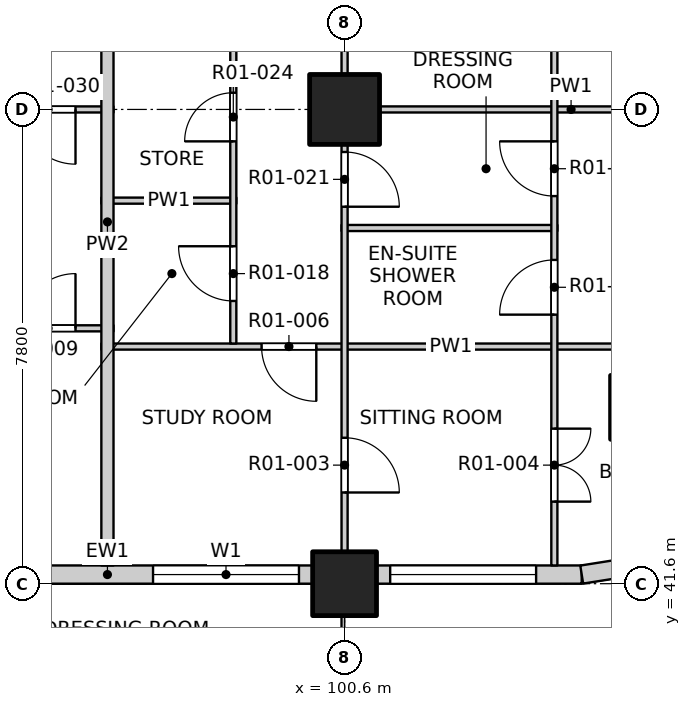
"""IFC4 building model, lengths in metres.
Left out: names, types, materials, properties, quantities, classifications, styles, units other than length and angle.
Written with IfcOpenShell. Run it as: python <this file> out.ifc"""

import sys

from ifc_helpers import new_model, si_unit, direction, frame, frame_2d, origin, origin_2d, place, context, subcontext, project, spatial, rectangle, extrude, element, fill, save


model = new_model("IFC4")
c1 = context("Model", 3, precision=1e-05, world=origin(), true_north=direction((0.0, 1.0)))
c2 = subcontext(c1, "Body", "Model", "MODEL_VIEW")
j1 = project(units=[si_unit("LENGTHUNIT", "METRE"), si_unit("PLANEANGLEUNIT", "RADIAN")], contexts=[c1])
p1 = place(None, origin())
s1 = spatial("IfcSite", under=j1, at=p1, CompositionType="ELEMENT")
p2 = place(p1, origin())
s2 = spatial("IfcBuilding", under=s1, at=p2, CompositionType="ELEMENT")
p3 = place(p2, frame((0.0, 0.0, 26.3)))
s3 = spatial("IfcBuildingStorey", under=s2, at=p3, CompositionType="ELEMENT", Elevation=26.3)
for number, where, z_axis, x_axis in (
    (1, (105.5, 44.5, -0.25), (0.0, 0.0, 1.0), (1.0, 0.0, 0.0)),
    (2, (100.6, 41.6, -0.25), (0.0, 0.0, 1.0), (1.0, 0.0, 0.0)),
):
    element("IfcColumn", number, at=place(p3, frame(where, z_axis=z_axis, x_axis=x_axis)), inside=s3, PredefinedType="COLUMN", context=c2, shape_type="SweptSolid", body=[
        extrude(rectangle(XDim=1.05, YDim=1.05, at=origin_2d()), origin(), (0.0, 0.0, 1.0), 3.4),
    ])
p4 = place(p3, frame((100.6, 49.4, -0.25), z_axis=(0.0, 0.0, 1.0), x_axis=(1.0, 0.0, 0.0)))
e3 = element("IfcColumn", 3, at=p4, inside=s3, PredefinedType="COLUMN", context=c2, shape_type="SweptSolid", body=[
    extrude(rectangle(XDim=1.15, YDim=1.15, at=origin_2d()), origin(), (0.0, 0.0, 1.0), 3.4),
])
p5 = place(p3, frame((93.325, 41.75, 0.0), z_axis=(0.0, 0.0, 1.0), x_axis=(1.0, 0.0, 0.0)))
e4 = element("IfcWall", 4, at=p5, inside=s3, PredefinedType="SOLIDWALL", context=c2, shape_type="SweptSolid", body=[
    extrude(rectangle(XDim=6.75, YDim=0.3, at=frame_2d((3.375, 0.0))), origin(), (0.0, 0.0, 1.0), 2.7),
])
p6 = place(p5, frame((0.525, 0.0, 0.0)))
e5 = element("IfcOpeningElement", 5, at=p6, cuts=e4, PredefinedType="OPENING", context=c2, shape_type="SweptSolid", body=[
    extrude(rectangle(XDim=1.8, YDim=2.4, at=frame_2d((0.9, 1.2))), frame((0.0, 0.16, 0.0), z_axis=(0.0, -1.0, 0.0), x_axis=(1.0, 0.0, 0.0)), (0.0, 0.0, 1.0), 0.32),
])
p7 = place(p5, frame((4.125, 0.0, 0.9)))
e6 = element("IfcOpeningElement", 6, at=p7, cuts=e4, PredefinedType="OPENING", context=c2, shape_type="SweptSolid", body=[
    extrude(rectangle(XDim=2.4, YDim=1.8, at=frame_2d((1.2, 0.9))), frame((0.0, 0.16, 0.0), z_axis=(0.0, -1.0, 0.0), x_axis=(1.0, 0.0, 0.0)), (0.0, 0.0, 1.0), 0.32),
])
p8 = place(p3, frame((101.125, 41.75, 0.0), z_axis=(0.0, 0.0, 1.0), x_axis=(1.0, 0.0, 0.0)))
e7 = element("IfcWall", 7, at=p8, inside=s3, PredefinedType="SOLIDWALL", context=c2, shape_type="SweptSolid", body=[
    extrude(rectangle(XDim=3.375, YDim=0.3, at=frame_2d((1.688, 0.0))), origin(), (0.0, 0.0, 1.0), 2.7),
])
p9 = place(p8, frame((0.225, 0.0, 0.9)))
e8 = element("IfcOpeningElement", 8, at=p9, cuts=e7, PredefinedType="OPENING", context=c2, shape_type="SweptSolid", body=[
    extrude(rectangle(XDim=2.4, YDim=1.8, at=frame_2d((1.2, 0.9))), frame((0.0, 0.16, 0.0), z_axis=(0.0, -1.0, 0.0), x_axis=(1.0, 0.0, 0.0)), (0.0, 0.0, 1.0), 0.32),
])
p10 = place(p3, frame((104.5, 41.75, 0.0), z_axis=(0.0, 0.0, 1.0), x_axis=(0.987678452879, 0.156496880861, 0.0)))
e9 = element("IfcWall", 9, at=p10, inside=s3, PredefinedType="SOLIDWALL", context=c2, shape_type="SweptSolid", body=[
    extrude(rectangle(XDim=1.173, YDim=0.3, at=frame_2d((0.586, 0.0))), origin(), (0.0, 0.0, 1.0), 2.7),
])
p11 = place(p3, frame((96.6, 45.5, 0.0), z_axis=(0.0, 0.0, 1.0), x_axis=(1.0, 0.0, 0.0)))
e10 = element("IfcWall", 10, at=p11, inside=s3, PredefinedType="PARTITIONING", context=c2, shape_type="SweptSolid", body=[
    extrude(rectangle(XDim=11.5, YDim=0.1, at=frame_2d((5.75, 0.0))), origin(), (0.0, 0.0, 1.0), 3.15),
])
p12 = place(p11, frame((2.635, 0.0, 0.0)))
e11 = element("IfcOpeningElement", 11, at=p12, cuts=e10, PredefinedType="OPENING", context=c2, shape_type="SweptSolid", body=[
    extrude(rectangle(XDim=0.9, YDim=2.1, at=frame_2d((0.45, 1.05))), frame((0.0, 0.06, 0.0), z_axis=(0.0, -1.0, 0.0), x_axis=(1.0, 0.0, 0.0)), (0.0, 0.0, 1.0), 0.12),
])
p13 = place(p3, frame((88.8, 45.8, 0.0), z_axis=(0.0, 0.0, 1.0), x_axis=(1.0, 0.0, 0.0)))
e12 = element("IfcWall", 12, at=p13, inside=s3, PredefinedType="PARTITIONING", context=c2, shape_type="SweptSolid", body=[
    extrude(rectangle(XDim=8.0, YDim=0.1, at=frame_2d((4.0, 0.0))), origin(), (0.0, 0.0, 1.0), 3.15),
])
p14 = place(p13, frame((1.45, 0.0, 0.0)))
e13 = element("IfcOpeningElement", 13, at=p14, cuts=e12, PredefinedType="OPENING", context=c2, shape_type="SweptSolid", body=[
    extrude(rectangle(XDim=1.2, YDim=2.1, at=frame_2d((0.6, 1.05))), frame((0.0, 0.06, 0.0), z_axis=(0.0, -1.0, 0.0), x_axis=(1.0, 0.0, 0.0)), (0.0, 0.0, 1.0), 0.12),
])
p15 = place(p13, frame((4.525, 0.0, 0.0)))
e14 = element("IfcOpeningElement", 14, at=p15, cuts=e12, PredefinedType="OPENING", context=c2, shape_type="SweptSolid", body=[
    extrude(rectangle(XDim=0.9, YDim=2.1, at=frame_2d((0.45, 1.05))), frame((0.0, 0.06, 0.0), z_axis=(0.0, -1.0, 0.0), x_axis=(1.0, 0.0, 0.0)), (0.0, 0.0, 1.0), 0.12),
])
p16 = place(p13, frame((6.475, 0.0, 0.0)))
e15 = element("IfcOpeningElement", 15, at=p16, cuts=e12, PredefinedType="OPENING", context=c2, shape_type="SweptSolid", body=[
    extrude(rectangle(XDim=0.9, YDim=2.1, at=frame_2d((0.45, 1.05))), frame((0.0, 0.06, 0.0), z_axis=(0.0, -1.0, 0.0), x_axis=(1.0, 0.0, 0.0)), (0.0, 0.0, 1.0), 0.12),
])
p17 = place(p3, frame((100.55, 47.45, 0.0), z_axis=(0.0, 0.0, 1.0), x_axis=(1.0, 0.0, 0.0)))
e16 = element("IfcWall", 16, at=p17, inside=s3, PredefinedType="PARTITIONING", context=c2, shape_type="SweptSolid", body=[
    extrude(rectangle(XDim=3.55, YDim=0.1, at=frame_2d((1.775, 0.0))), origin(), (0.0, 0.0, 1.0), 3.15),
])
p18 = place(p3, frame((96.6, 47.9, 0.0), z_axis=(0.0, 0.0, 1.0), x_axis=(1.0, 0.0, 0.0)))
e17 = element("IfcWall", 17, at=p18, inside=s3, PredefinedType="PARTITIONING", context=c2, shape_type="SweptSolid", body=[
    extrude(rectangle(XDim=2.22, YDim=0.1, at=frame_2d((1.11, 0.0))), origin(), (0.0, 0.0, 1.0), 3.15),
])
p19 = place(p3, frame((73.2, 49.4, 0.0), z_axis=(0.0, 0.0, 1.0), x_axis=(1.0, 0.0, 0.0)))
e18 = element("IfcWall", 18, at=p19, inside=s3, PredefinedType="PARTITIONING", context=c2, shape_type="SweptSolid", body=[
    extrude(rectangle(XDim=23.6, YDim=0.1, at=frame_2d((11.8, 0.0))), origin(), (0.0, 0.0, 1.0), 3.15),
])
p20 = place(p19, frame((2.425, 0.0, 0.0)))
e19 = element("IfcOpeningElement", 19, at=p20, cuts=e18, PredefinedType="OPENING", context=c2, shape_type="SweptSolid", body=[
    extrude(rectangle(XDim=0.9, YDim=2.1, at=frame_2d((0.45, 1.05))), frame((0.0, 0.06, 0.0), z_axis=(0.0, -1.0, 0.0), x_axis=(1.0, 0.0, 0.0)), (0.0, 0.0, 1.0), 0.12),
])
p21 = place(p19, frame((5.5, 0.0, 0.0)))
e20 = element("IfcOpeningElement", 20, at=p21, cuts=e18, PredefinedType="OPENING", context=c2, shape_type="SweptSolid", body=[
    extrude(rectangle(XDim=0.9, YDim=2.1, at=frame_2d((0.45, 1.05))), frame((0.0, 0.06, 0.0), z_axis=(0.0, -1.0, 0.0), x_axis=(1.0, 0.0, 0.0)), (0.0, 0.0, 1.0), 0.12),
])
p22 = place(p19, frame((9.4, 0.0, 0.0)))
e21 = element("IfcOpeningElement", 21, at=p22, cuts=e18, PredefinedType="OPENING", context=c2, shape_type="SweptSolid", body=[
    extrude(rectangle(XDim=0.9, YDim=2.1, at=frame_2d((0.45, 1.05))), frame((0.0, 0.06, 0.0), z_axis=(0.0, -1.0, 0.0), x_axis=(1.0, 0.0, 0.0)), (0.0, 0.0, 1.0), 0.12),
])
p23 = place(p19, frame((14.275, 0.0, 0.0)))
e22 = element("IfcOpeningElement", 22, at=p23, cuts=e18, PredefinedType="OPENING", context=c2, shape_type="SweptSolid", body=[
    extrude(rectangle(XDim=0.9, YDim=2.1, at=frame_2d((0.45, 1.05))), frame((0.0, 0.06, 0.0), z_axis=(0.0, -1.0, 0.0), x_axis=(1.0, 0.0, 0.0)), (0.0, 0.0, 1.0), 0.12),
])
p24 = place(p19, frame((17.2, 0.0, 0.0)))
e23 = element("IfcOpeningElement", 23, at=p24, cuts=e18, PredefinedType="OPENING", context=c2, shape_type="SweptSolid", body=[
    extrude(rectangle(XDim=0.9, YDim=2.1, at=frame_2d((0.45, 1.05))), frame((0.0, 0.06, 0.0), z_axis=(0.0, -1.0, 0.0), x_axis=(1.0, 0.0, 0.0)), (0.0, 0.0, 1.0), 0.12),
])
p25 = place(p19, frame((22.075, 0.0, 0.0)))
e24 = element("IfcOpeningElement", 24, at=p25, cuts=e18, PredefinedType="OPENING", context=c2, shape_type="SweptSolid", body=[
    extrude(rectangle(XDim=0.9, YDim=2.1, at=frame_2d((0.45, 1.05))), frame((0.0, 0.06, 0.0), z_axis=(0.0, -1.0, 0.0), x_axis=(1.0, 0.0, 0.0)), (0.0, 0.0, 1.0), 0.12),
])
p26 = place(p3, frame((100.55, 49.4, 0.0), z_axis=(0.0, 0.0, 1.0), x_axis=(1.0, 0.0, 0.0)))
e25 = element("IfcWall", 25, at=p26, inside=s3, PredefinedType="PARTITIONING", context=c2, shape_type="SweptSolid", body=[
    extrude(rectangle(XDim=7.55, YDim=0.1, at=frame_2d((3.775, 0.0))), origin(), (0.0, 0.0, 1.0), 2.55),
])
p27 = place(p3, frame((96.7, 41.9, 0.0), z_axis=(0.0, 0.0, 1.0), x_axis=(0.0, 1.0, 0.0)))
e26 = element("IfcWall", 26, at=p27, inside=s3, PredefinedType="PARTITIONING", context=c2, shape_type="SweptSolid", body=[
    extrude(rectangle(XDim=11.3, YDim=0.2, at=frame_2d((5.65, 0.0))), origin(), (0.0, 0.0, 1.0), 3.15),
])
p28 = place(p3, frame((98.77, 45.55, 0.0), z_axis=(0.0, 0.0, 1.0), x_axis=(0.0, 1.0, 0.0)))
e27 = element("IfcWall", 27, at=p28, inside=s3, PredefinedType="PARTITIONING", context=c2, shape_type="SweptSolid", body=[
    extrude(rectangle(XDim=12.1, YDim=0.1, at=frame_2d((6.05, 0.0))), origin(), (0.0, 0.0, 1.0), 3.15),
])
p29 = place(p28, frame((0.7, 0.0, 0.0)))
e28 = element("IfcOpeningElement", 28, at=p29, cuts=e27, PredefinedType="OPENING", context=c2, shape_type="SweptSolid", body=[
    extrude(rectangle(XDim=0.9, YDim=2.1, at=frame_2d((0.45, 1.05))), frame((0.0, 0.06, 0.0), z_axis=(0.0, -1.0, 0.0), x_axis=(1.0, 0.0, 0.0)), (0.0, 0.0, 1.0), 0.12),
])
p30 = place(p28, frame((3.325, 0.0, 0.0)))
e29 = element("IfcOpeningElement", 29, at=p30, cuts=e27, PredefinedType="OPENING", context=c2, shape_type="SweptSolid", body=[
    extrude(rectangle(XDim=0.8, YDim=2.1, at=frame_2d((0.4, 1.05))), frame((0.0, 0.06, 0.0), z_axis=(0.0, -1.0, 0.0), x_axis=(1.0, 0.0, 0.0)), (0.0, 0.0, 1.0), 0.12),
])
p31 = place(p28, frame((6.15, 0.0, 0.0)))
e30 = element("IfcOpeningElement", 30, at=p31, cuts=e27, PredefinedType="OPENING", context=c2, shape_type="SweptSolid", body=[
    extrude(rectangle(XDim=0.8, YDim=2.1, at=frame_2d((0.4, 1.05))), frame((0.0, 0.06, 0.0), z_axis=(0.0, -1.0, 0.0), x_axis=(1.0, 0.0, 0.0)), (0.0, 0.0, 1.0), 0.12),
])
p32 = place(p28, frame((8.75, 0.0, 0.0)))
e31 = element("IfcOpeningElement", 31, at=p32, cuts=e27, PredefinedType="OPENING", context=c2, shape_type="SweptSolid", body=[
    extrude(rectangle(XDim=0.8, YDim=2.1, at=frame_2d((0.4, 1.05))), frame((0.0, 0.06, 0.0), z_axis=(0.0, -1.0, 0.0), x_axis=(1.0, 0.0, 0.0)), (0.0, 0.0, 1.0), 0.12),
])
p33 = place(p28, frame((10.775, 0.0, 0.0)))
e32 = element("IfcOpeningElement", 32, at=p33, cuts=e27, PredefinedType="OPENING", context=c2, shape_type="SweptSolid", body=[
    extrude(rectangle(XDim=0.9, YDim=2.1, at=frame_2d((0.45, 1.05))), frame((0.0, 0.06, 0.0), z_axis=(0.0, -1.0, 0.0), x_axis=(1.0, 0.0, 0.0)), (0.0, 0.0, 1.0), 0.12),
])
p34 = place(p3, frame((100.6, 41.9, 0.0), z_axis=(0.0, 0.0, 1.0), x_axis=(0.0, 1.0, 0.0)))
e33 = element("IfcWall", 33, at=p34, inside=s3, PredefinedType="PARTITIONING", context=c2, shape_type="SweptSolid", body=[
    extrude(rectangle(XDim=7.5, YDim=0.1, at=frame_2d((3.75, 0.0))), origin(), (0.0, 0.0, 1.0), 2.55),
])
p35 = place(p34, frame((1.2, 0.0, 0.0)))
e34 = element("IfcOpeningElement", 34, at=p35, cuts=e33, PredefinedType="OPENING", context=c2, shape_type="SweptSolid", body=[
    extrude(rectangle(XDim=0.9, YDim=2.1, at=frame_2d((0.45, 1.05))), frame((0.0, 0.06, 0.0), z_axis=(0.0, -1.0, 0.0), x_axis=(1.0, 0.0, 0.0)), (0.0, 0.0, 1.0), 0.12),
])
p36 = place(p34, frame((5.9, 0.0, 0.0)))
e35 = element("IfcOpeningElement", 35, at=p36, cuts=e33, PredefinedType="OPENING", context=c2, shape_type="SweptSolid", body=[
    extrude(rectangle(XDim=0.9, YDim=2.1, at=frame_2d((0.45, 1.05))), frame((0.0, 0.06, 0.0), z_axis=(0.0, -1.0, 0.0), x_axis=(1.0, 0.0, 0.0)), (0.0, 0.0, 1.0), 0.12),
])
p37 = place(p3, frame((100.6, 49.4, 0.0), z_axis=(0.0, 0.0, 1.0), x_axis=(0.0, 1.0, 0.0)))
e36 = element("IfcWall", 36, at=p37, inside=s3, PredefinedType="PARTITIONING", context=c2, shape_type="SweptSolid", body=[
    extrude(rectangle(XDim=31.2, YDim=0.1, at=frame_2d((15.6, 0.0))), origin(), (0.0, 0.0, 1.0), 3.15),
])
p38 = place(p37, frame((1.5, 0.0, 0.0)))
e37 = element("IfcOpeningElement", 37, at=p38, cuts=e36, PredefinedType="OPENING", context=c2, shape_type="SweptSolid", body=[
    extrude(rectangle(XDim=0.9, YDim=2.1, at=frame_2d((0.45, 1.05))), frame((0.0, 0.06, 0.0), z_axis=(0.0, -1.0, 0.0), x_axis=(1.0, 0.0, 0.0)), (0.0, 0.0, 1.0), 0.12),
])
p39 = place(p37, frame((5.4, 0.0, 0.0)))
e38 = element("IfcOpeningElement", 38, at=p39, cuts=e36, PredefinedType="OPENING", context=c2, shape_type="SweptSolid", body=[
    extrude(rectangle(XDim=0.9, YDim=2.1, at=frame_2d((0.45, 1.05))), frame((0.0, 0.06, 0.0), z_axis=(0.0, -1.0, 0.0), x_axis=(1.0, 0.0, 0.0)), (0.0, 0.0, 1.0), 0.12),
])
p40 = place(p37, frame((10.275, 0.0, 0.0)))
e39 = element("IfcOpeningElement", 39, at=p40, cuts=e36, PredefinedType="OPENING", context=c2, shape_type="SweptSolid", body=[
    extrude(rectangle(XDim=0.9, YDim=2.1, at=frame_2d((0.45, 1.05))), frame((0.0, 0.06, 0.0), z_axis=(0.0, -1.0, 0.0), x_axis=(1.0, 0.0, 0.0)), (0.0, 0.0, 1.0), 0.12),
])
p41 = place(p37, frame((14.0, 0.0, 0.0)))
e40 = element("IfcOpeningElement", 40, at=p41, cuts=e36, PredefinedType="OPENING", context=c2, shape_type="SweptSolid", body=[
    extrude(rectangle(XDim=0.9, YDim=2.1, at=frame_2d((0.45, 1.05))), frame((0.0, 0.06, 0.0), z_axis=(0.0, -1.0, 0.0), x_axis=(1.0, 0.0, 0.0)), (0.0, 0.0, 1.0), 0.12),
])
p42 = place(p37, frame((17.1, 0.0, 0.0)))
e41 = element("IfcOpeningElement", 41, at=p42, cuts=e36, PredefinedType="OPENING", context=c2, shape_type="SweptSolid", body=[
    extrude(rectangle(XDim=0.9, YDim=2.1, at=frame_2d((0.45, 1.05))), frame((0.0, 0.06, 0.0), z_axis=(0.0, -1.0, 0.0), x_axis=(1.0, 0.0, 0.0)), (0.0, 0.0, 1.0), 0.12),
])
p43 = place(p37, frame((21.8, 0.0, 0.0)))
e42 = element("IfcOpeningElement", 42, at=p43, cuts=e36, PredefinedType="OPENING", context=c2, shape_type="SweptSolid", body=[
    extrude(rectangle(XDim=0.9, YDim=2.1, at=frame_2d((0.45, 1.05))), frame((0.0, 0.06, 0.0), z_axis=(0.0, -1.0, 0.0), x_axis=(1.0, 0.0, 0.0)), (0.0, 0.0, 1.0), 0.12),
])
p44 = place(p37, frame((24.9, 0.0, 0.0)))
e43 = element("IfcOpeningElement", 43, at=p44, cuts=e36, PredefinedType="OPENING", context=c2, shape_type="SweptSolid", body=[
    extrude(rectangle(XDim=0.9, YDim=2.1, at=frame_2d((0.45, 1.05))), frame((0.0, 0.06, 0.0), z_axis=(0.0, -1.0, 0.0), x_axis=(1.0, 0.0, 0.0)), (0.0, 0.0, 1.0), 0.12),
])
p45 = place(p37, frame((28.8, 0.0, 0.0)))
e44 = element("IfcOpeningElement", 44, at=p45, cuts=e36, PredefinedType="OPENING", context=c2, shape_type="SweptSolid", body=[
    extrude(rectangle(XDim=0.9, YDim=2.1, at=frame_2d((0.45, 1.05))), frame((0.0, 0.06, 0.0), z_axis=(0.0, -1.0, 0.0), x_axis=(1.0, 0.0, 0.0)), (0.0, 0.0, 1.0), 0.12),
])
p46 = place(p3, frame((104.05, 41.9, 0.0), z_axis=(0.0, 0.0, 1.0), x_axis=(0.0, 1.0, 0.0)))
e45 = element("IfcWall", 45, at=p46, inside=s3, PredefinedType="PARTITIONING", context=c2, shape_type="SweptSolid", body=[
    extrude(rectangle(XDim=19.1, YDim=0.1, at=frame_2d((9.55, 0.0))), origin(), (0.0, 0.0, 1.0), 3.15),
])
p47 = place(p46, frame((1.05, 0.0, 0.0)))
e46 = element("IfcOpeningElement", 46, at=p47, cuts=e45, PredefinedType="OPENING", context=c2, shape_type="SweptSolid", body=[
    extrude(rectangle(XDim=1.2, YDim=2.1, at=frame_2d((0.6, 1.05))), frame((0.0, 0.06, 0.0), z_axis=(0.0, -1.0, 0.0), x_axis=(1.0, 0.0, 0.0)), (0.0, 0.0, 1.0), 0.12),
])
p48 = place(p46, frame((4.125, 0.0, 0.0)))
e47 = element("IfcOpeningElement", 47, at=p48, cuts=e45, PredefinedType="OPENING", context=c2, shape_type="SweptSolid", body=[
    extrude(rectangle(XDim=0.9, YDim=2.1, at=frame_2d((0.45, 1.05))), frame((0.0, 0.06, 0.0), z_axis=(0.0, -1.0, 0.0), x_axis=(1.0, 0.0, 0.0)), (0.0, 0.0, 1.0), 0.12),
])
p49 = place(p46, frame((6.075, 0.0, 0.0)))
e48 = element("IfcOpeningElement", 48, at=p49, cuts=e45, PredefinedType="OPENING", context=c2, shape_type="SweptSolid", body=[
    extrude(rectangle(XDim=0.9, YDim=2.1, at=frame_2d((0.45, 1.05))), frame((0.0, 0.06, 0.0), z_axis=(0.0, -1.0, 0.0), x_axis=(1.0, 0.0, 0.0)), (0.0, 0.0, 1.0), 0.12),
])
p50 = place(p46, frame((8.85, 0.0, 0.0)))
e49 = element("IfcOpeningElement", 49, at=p50, cuts=e45, PredefinedType="OPENING", context=c2, shape_type="SweptSolid", body=[
    extrude(rectangle(XDim=1.2, YDim=2.1, at=frame_2d((0.6, 1.05))), frame((0.0, 0.06, 0.0), z_axis=(0.0, -1.0, 0.0), x_axis=(1.0, 0.0, 0.0)), (0.0, 0.0, 1.0), 0.12),
])
p51 = place(p46, frame((12.75, 0.0, 0.0)))
e50 = element("IfcOpeningElement", 50, at=p51, cuts=e45, PredefinedType="OPENING", context=c2, shape_type="SweptSolid", body=[
    extrude(rectangle(XDim=1.2, YDim=2.1, at=frame_2d((0.6, 1.05))), frame((0.0, 0.06, 0.0), z_axis=(0.0, -1.0, 0.0), x_axis=(1.0, 0.0, 0.0)), (0.0, 0.0, 1.0), 0.12),
])
p52 = place(p46, frame((15.825, 0.0, 0.0)))
e51 = element("IfcOpeningElement", 51, at=p52, cuts=e45, PredefinedType="OPENING", context=c2, shape_type="SweptSolid", body=[
    extrude(rectangle(XDim=0.9, YDim=2.1, at=frame_2d((0.45, 1.05))), frame((0.0, 0.06, 0.0), z_axis=(0.0, -1.0, 0.0), x_axis=(1.0, 0.0, 0.0)), (0.0, 0.0, 1.0), 0.12),
])
p53 = place(p46, frame((17.775, 0.0, 0.0)))
e52 = element("IfcOpeningElement", 52, at=p53, cuts=e45, PredefinedType="OPENING", context=c2, shape_type="SweptSolid", body=[
    extrude(rectangle(XDim=0.9, YDim=2.1, at=frame_2d((0.45, 1.05))), frame((0.0, 0.06, 0.0), z_axis=(0.0, -1.0, 0.0), x_axis=(1.0, 0.0, 0.0)), (0.0, 0.0, 1.0), 0.12),
])
p54 = place(p7, origin())
e53 = element("IfcWindow", 53, at=p54, inside=s3, PartitioningType="DOUBLE_PANEL_VERTICAL", PredefinedType="WINDOW", context=c2, shape_type="SweptSolid", body=[
    extrude(rectangle(XDim=2.4, YDim=1.8, at=frame_2d((1.2, 0.9))), frame((0.0, 0.03, 0.0), z_axis=(0.0, -1.0, 0.0), x_axis=(1.0, 0.0, 0.0)), (0.0, 0.0, 1.0), 0.06),
])
fill(e6, e53)
p55 = place(p9, origin())
e54 = element("IfcWindow", 54, at=p55, inside=s3, PartitioningType="DOUBLE_PANEL_VERTICAL", PredefinedType="WINDOW", context=c2, shape_type="SweptSolid", body=[
    extrude(rectangle(XDim=2.4, YDim=1.8, at=frame_2d((1.2, 0.9))), frame((0.0, 0.03, 0.0), z_axis=(0.0, -1.0, 0.0), x_axis=(1.0, 0.0, 0.0)), (0.0, 0.0, 1.0), 0.06),
])
fill(e8, e54)
p56 = place(p35, origin())
e55 = element("IfcDoor", 55, at=p56, inside=s3, OperationType="SINGLE_SWING_RIGHT", PredefinedType="DOOR", context=c2, shape_type="SweptSolid", body=[
    extrude(rectangle(XDim=0.9, YDim=2.1, at=frame_2d((0.45, 1.05))), frame((0.0, 0.025, 0.0), z_axis=(0.0, -1.0, 0.0), x_axis=(1.0, 0.0, 0.0)), (0.0, 0.0, 1.0), 0.05),
])
fill(e34, e55)
p57 = place(p47, origin())
e56 = element("IfcDoor", 56, at=p57, inside=s3, OperationType="DOUBLE_DOOR_SINGLE_SWING", PredefinedType="DOOR", context=c2, shape_type="SweptSolid", body=[
    extrude(rectangle(XDim=1.2, YDim=2.1, at=frame_2d((0.6, 1.05))), frame((0.0, 0.025, 0.0), z_axis=(0.0, -1.0, 0.0), x_axis=(1.0, 0.0, 0.0)), (0.0, 0.0, 1.0), 0.05),
])
fill(e46, e56)
p58 = place(p12, origin())
e57 = element("IfcDoor", 57, at=p58, inside=s3, OperationType="SINGLE_SWING_LEFT", PredefinedType="DOOR", context=c2, shape_type="SweptSolid", body=[
    extrude(rectangle(XDim=0.9, YDim=2.1, at=frame_2d((0.45, 1.05))), frame((0.0, 0.025, 0.0), z_axis=(0.0, -1.0, 0.0), x_axis=(1.0, 0.0, 0.0)), (0.0, 0.0, 1.0), 0.05),
])
fill(e11, e57)
p59 = place(p16, origin())
e58 = element("IfcDoor", 58, at=p59, inside=s3, OperationType="SINGLE_SWING_RIGHT", PredefinedType="DOOR", context=c2, shape_type="SweptSolid", body=[
    extrude(rectangle(XDim=0.9, YDim=2.1, at=frame_2d((0.45, 1.05))), frame((0.0, 0.025, 0.0), z_axis=(0.0, -1.0, 0.0), x_axis=(1.0, 0.0, 0.0)), (0.0, 0.0, 1.0), 0.05),
])
fill(e15, e58)
p60 = place(p48, origin())
e59 = element("IfcDoor", 59, at=p60, inside=s3, OperationType="SINGLE_SWING_LEFT", PredefinedType="DOOR", context=c2, shape_type="SweptSolid", body=[
    extrude(rectangle(XDim=0.9, YDim=2.1, at=frame_2d((0.45, 1.05))), frame((0.0, 0.025, 0.0), z_axis=(0.0, -1.0, 0.0), x_axis=(1.0, 0.0, 0.0)), (0.0, 0.0, 1.0), 0.05),
])
fill(e47, e59)
p61 = place(p29, origin())
e60 = element("IfcDoor", 60, at=p61, inside=s3, OperationType="SINGLE_SWING_RIGHT", PredefinedType="DOOR", context=c2, shape_type="SweptSolid", body=[
    extrude(rectangle(XDim=0.9, YDim=2.1, at=frame_2d((0.45, 1.05))), frame((0.0, 0.025, 0.0), z_axis=(0.0, -1.0, 0.0), x_axis=(1.0, 0.0, 0.0)), (0.0, 0.0, 1.0), 0.05),
])
fill(e28, e60)
p62 = place(p36, origin())
e61 = element("IfcDoor", 61, at=p62, inside=s3, OperationType="SINGLE_SWING_RIGHT", PredefinedType="DOOR", context=c2, shape_type="SweptSolid", body=[
    extrude(rectangle(XDim=0.9, YDim=2.1, at=frame_2d((0.45, 1.05))), frame((0.0, 0.025, 0.0), z_axis=(0.0, -1.0, 0.0), x_axis=(1.0, 0.0, 0.0)), (0.0, 0.0, 1.0), 0.05),
])
fill(e35, e61)
p63 = place(p49, origin())
e62 = element("IfcDoor", 62, at=p63, inside=s3, OperationType="SINGLE_SWING_RIGHT", PredefinedType="DOOR", context=c2, shape_type="SweptSolid", body=[
    extrude(rectangle(XDim=0.9, YDim=2.1, at=frame_2d((0.45, 1.05))), frame((0.0, 0.025, 0.0), z_axis=(0.0, -1.0, 0.0), x_axis=(1.0, 0.0, 0.0)), (0.0, 0.0, 1.0), 0.05),
])
fill(e48, e62)
p64 = place(p30, origin())
e63 = element("IfcDoor", 63, at=p64, inside=s3, OperationType="SINGLE_SWING_LEFT", PredefinedType="DOOR", context=c2, shape_type="SweptSolid", body=[
    extrude(rectangle(XDim=0.8, YDim=2.1, at=frame_2d((0.4, 1.05))), frame((0.0, 0.025, 0.0), z_axis=(0.0, -1.0, 0.0), x_axis=(1.0, 0.0, 0.0)), (0.0, 0.0, 1.0), 0.05),
])
fill(e29, e63)
p65 = place(p25, origin())
e64 = element("IfcDoor", 64, at=p65, inside=s3, OperationType="SINGLE_SWING_LEFT", PredefinedType="DOOR", context=c2, shape_type="SweptSolid", body=[
    extrude(rectangle(XDim=0.9, YDim=2.1, at=frame_2d((0.45, 1.05))), frame((0.0, 0.025, 0.0), z_axis=(0.0, -1.0, 0.0), x_axis=(1.0, 0.0, 0.0)), (0.0, 0.0, 1.0), 0.05),
])
fill(e24, e64)
save(model, sys.argv[1])
